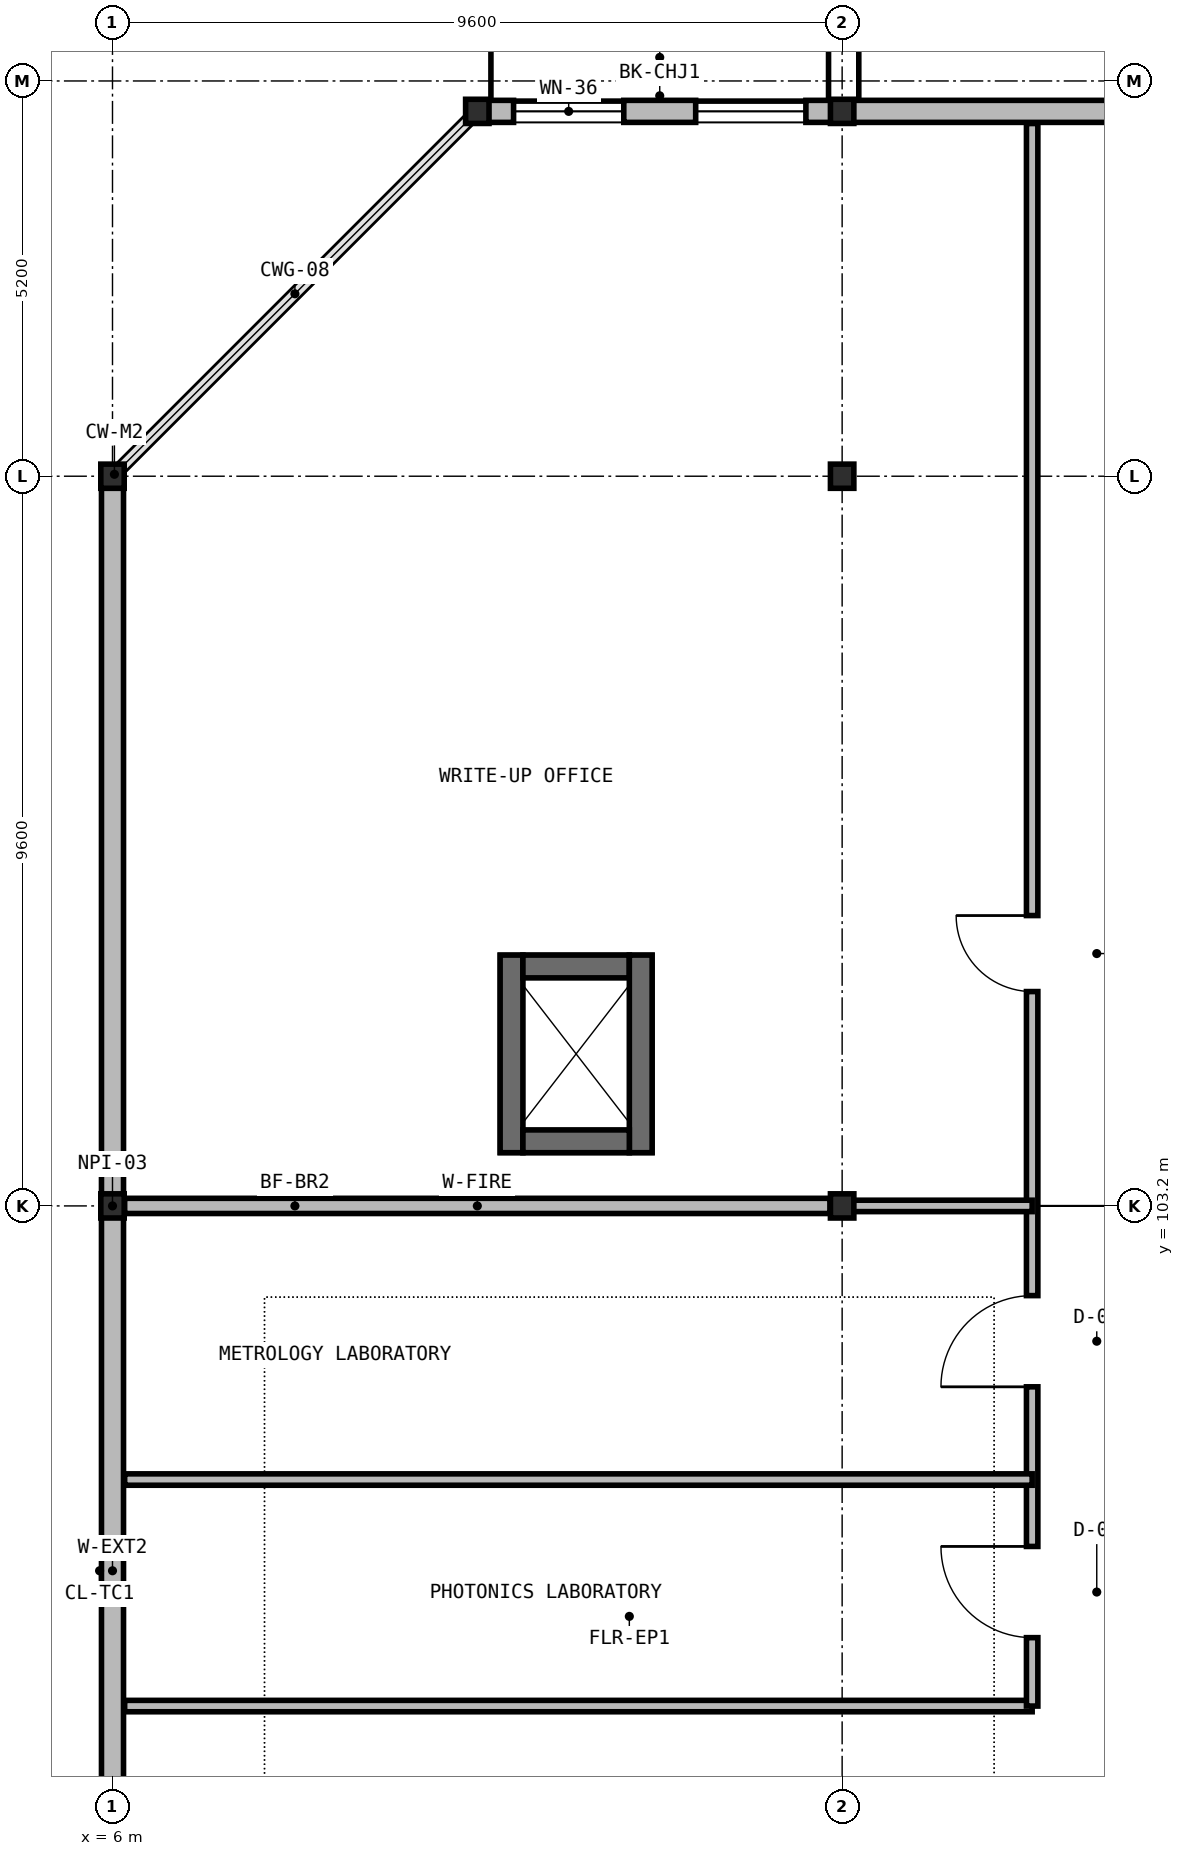
"""IFC4 building model, lengths in metres.
Left out: names, types, materials, properties, quantities, classifications, styles, units other than length and angle.
Written with IfcOpenShell. Run it as: python <this file> out.ifc"""

import sys

from ifc_helpers import new_model, si_unit, direction, frame, frame_2d, origin, origin_2d, place, context, subcontext, project, spatial, rectangle, i_section, extrude, element, fill, save


model = new_model("IFC4")
c1 = context("Model", 3, precision=1e-05, world=origin(), true_north=direction((0.0, 1.0)))
c2 = subcontext(c1, "Body", "Model", "MODEL_VIEW")
j1 = project(units=[si_unit("LENGTHUNIT", "METRE"), si_unit("PLANEANGLEUNIT", "RADIAN")], contexts=[c1])
p1 = place(None, origin())
s1 = spatial("IfcSite", under=j1, at=p1, CompositionType="ELEMENT")
p2 = place(p1, origin())
s2 = spatial("IfcBuilding", under=s1, at=p2, CompositionType="ELEMENT")
p3 = place(p2, frame((0.0, 0.0, 18.9)))
s3 = spatial("IfcBuildingStorey", under=s2, at=p3, CompositionType="ELEMENT", Elevation=18.9)
for number, where, z_axis, x_axis in (
    (1, (6.0, 103.2, 0.0), (0.0, 0.0, 1.0), (1.0, 0.0, 0.0)),
    (2, (6.0, 112.8, 0.0), (0.0, 0.0, 1.0), (1.0, 0.0, 0.0)),
    (3, (15.6, 103.2, 0.0), (0.0, 0.0, 1.0), (1.0, 0.0, 0.0)),
    (4, (15.6, 112.8, 0.0), (0.0, 0.0, 1.0), (1.0, 0.0, 0.0)),
    (5, (15.6, 117.6, 0.0), (0.0, 0.0, 1.0), (1.0, 0.0, 0.0)),
    (6, (10.8, 117.6, 0.0), (0.0, 0.0, 1.0), (1.0, 0.0, 0.0)),
):
    element("IfcColumn", number, at=place(p3, frame(where, z_axis=z_axis, x_axis=x_axis)), inside=s3, PredefinedType="COLUMN", context=c2, shape_type="SweptSolid", body=[
        extrude(i_section(OverallWidth=0.308, OverallDepth=0.318, WebThickness=0.013, FlangeThickness=0.021, at=origin_2d()), origin(), (0.0, 0.0, 1.0), 4.55),
    ])
p4 = place(p3, frame((11.25, 103.9, 0.0), z_axis=(0.0, 0.0, 1.0), x_axis=(0.0, 1.0, 0.0)))
e7 = element("IfcWall", 7, at=p4, inside=s3, PredefinedType="SHEAR", context=c2, shape_type="SweptSolid", body=[
    extrude(rectangle(XDim=2.6, YDim=0.3, at=frame_2d((1.3, 0.0))), origin(), (0.0, 0.0, 1.0), 4.37),
])
p5 = place(p3, frame((11.4, 106.35, 0.0), z_axis=(0.0, 0.0, 1.0), x_axis=(1.0, 0.0, 0.0)))
e8 = element("IfcWall", 8, at=p5, inside=s3, PredefinedType="SHEAR", context=c2, shape_type="SweptSolid", body=[
    extrude(rectangle(XDim=1.4, YDim=0.3, at=frame_2d((0.7, 0.0))), origin(), (0.0, 0.0, 1.0), 4.37),
])
p6 = place(p3, frame((12.95, 106.5, 0.0), z_axis=(0.0, 0.0, 1.0), x_axis=(0.0, -1.0, 0.0)))
e9 = element("IfcWall", 9, at=p6, inside=s3, PredefinedType="SHEAR", context=c2, shape_type="SweptSolid", body=[
    extrude(rectangle(XDim=2.6, YDim=0.3, at=frame_2d((1.3, 0.0))), origin(), (0.0, 0.0, 1.0), 4.37),
])
p7 = place(p3, frame((12.8, 104.05, 0.0), z_axis=(0.0, 0.0, 1.0), x_axis=(-1.0, 0.0, 0.0)))
e10 = element("IfcWall", 10, at=p7, inside=s3, PredefinedType="SHEAR", context=c2, shape_type="SweptSolid", body=[
    extrude(rectangle(XDim=1.4, YDim=0.3, at=frame_2d((0.7, 0.0))), origin(), (0.0, 0.0, 1.0), 4.37),
])
p8 = place(p3, frame((6.0, 93.604, 0.0), z_axis=(0.0, 0.0, 1.0), x_axis=(0.0, 1.0, 0.0)))
e11 = element("IfcWall", 11, at=p8, inside=s3, PredefinedType="SOLIDWALL", context=c2, shape_type="SweptSolid", body=[
    extrude(rectangle(XDim=9.592, YDim=0.29, at=frame_2d((4.796, 0.0))), origin(), (0.0, 0.0, 1.0), 3.884),
])
p9 = place(p3, frame((6.0, 103.204, 0.0), z_axis=(0.0, 0.0, 1.0), x_axis=(0.0, 1.0, 0.0)))
e12 = element("IfcWall", 12, at=p9, inside=s3, PredefinedType="SOLIDWALL", context=c2, shape_type="SweptSolid", body=[
    extrude(rectangle(XDim=9.592, YDim=0.29, at=frame_2d((4.796, 0.0))), origin(), (0.0, 0.0, 1.0), 3.884),
])
p10 = place(p3, frame((10.804, 117.6, 0.0), z_axis=(0.0, 0.0, 1.0), x_axis=(1.0, 0.0, 0.0)))
e13 = element("IfcWall", 13, at=p10, inside=s3, PredefinedType="SOLIDWALL", context=c2, shape_type="SweptSolid", body=[
    extrude(rectangle(XDim=4.792, YDim=0.29, at=frame_2d((2.396, 0.0))), origin(), (0.0, 0.0, 1.0), 4.37),
])
p11 = place(p10, frame((0.473, 0.0, 0.95)))
e14 = element("IfcOpeningElement", 14, at=p11, cuts=e13, PredefinedType="OPENING", context=c2, shape_type="SweptSolid", body=[
    extrude(rectangle(XDim=1.45, YDim=1.43, at=frame_2d((0.725, 0.715))), frame((0.0, 0.155, 0.0), z_axis=(0.0, -1.0, 0.0), x_axis=(1.0, 0.0, 0.0)), (0.0, 0.0, 1.0), 0.31),
])
p12 = place(p10, frame((2.869, 0.0, 0.95)))
e15 = element("IfcOpeningElement", 15, at=p12, cuts=e13, PredefinedType="OPENING", context=c2, shape_type="SweptSolid", body=[
    extrude(rectangle(XDim=1.45, YDim=1.43, at=frame_2d((0.725, 0.715))), frame((0.0, 0.155, 0.0), z_axis=(0.0, -1.0, 0.0), x_axis=(1.0, 0.0, 0.0)), (0.0, 0.0, 1.0), 0.31),
])
p13 = place(p3, frame((15.604, 117.6, 0.0), z_axis=(0.0, 0.0, 1.0), x_axis=(1.0, 0.0, 0.0)))
e16 = element("IfcWall", 16, at=p13, inside=s3, PredefinedType="SOLIDWALL", context=c2, shape_type="SweptSolid", body=[
    extrude(rectangle(XDim=9.592, YDim=0.29, at=frame_2d((4.796, 0.0))), origin(), (0.0, 0.0, 1.0), 3.837),
])
p14 = place(p3, frame((6.16, 103.2, 0.0), z_axis=(0.0, 0.0, 1.0), x_axis=(1.0, 0.0, 0.0)))
e17 = element("IfcWall", 17, at=p14, inside=s3, PredefinedType="SOLIDWALL", context=c2, shape_type="SweptSolid", body=[
    extrude(rectangle(XDim=9.28, YDim=0.2, at=frame_2d((4.64, 0.0))), origin(), (0.0, 0.0, 1.0), 3.815),
])
p15 = place(p3, frame((6.16, 96.62, 0.0), z_axis=(0.0, 0.0, 1.0), x_axis=(1.0, 0.0, 0.0)))
e18 = element("IfcWall", 18, at=p15, inside=s3, PredefinedType="PARTITIONING", context=c2, shape_type="SweptSolid", body=[
    extrude(rectangle(XDim=11.94, YDim=0.15, at=frame_2d((5.97, 0.0))), origin(), (0.0, 0.0, 1.0), 4.3),
])
p16 = place(p3, frame((18.1, 96.62, 0.0), z_axis=(0.0, 0.0, 1.0), x_axis=(0.0, 1.0, 0.0)))
e19 = element("IfcWall", 19, at=p16, inside=s3, PredefinedType="PARTITIONING", context=c2, shape_type="SweptSolid", body=[
    extrude(rectangle(XDim=20.82, YDim=0.15, at=frame_2d((10.41, 0.0))), origin(), (0.0, 0.0, 1.0), 4.3),
])
p17 = place(p16, frame((0.9, 0.0, 0.0)))
e20 = element("IfcOpeningElement", 20, at=p17, cuts=e19, PredefinedType="OPENING", context=c2, shape_type="SweptSolid", body=[
    extrude(rectangle(XDim=1.2, YDim=2.2, at=frame_2d((0.6, 1.1))), frame((0.0, 0.085, 0.0), z_axis=(0.0, -1.0, 0.0), x_axis=(1.0, 0.0, 0.0)), (0.0, 0.0, 1.0), 0.17),
])
p18 = place(p16, frame((4.2, 0.0, 0.0)))
e21 = element("IfcOpeningElement", 21, at=p18, cuts=e19, PredefinedType="OPENING", context=c2, shape_type="SweptSolid", body=[
    extrude(rectangle(XDim=1.2, YDim=2.2, at=frame_2d((0.6, 1.1))), frame((0.0, 0.085, 0.0), z_axis=(0.0, -1.0, 0.0), x_axis=(1.0, 0.0, 0.0)), (0.0, 0.0, 1.0), 0.17),
])
p19 = place(p16, frame((9.4, 0.0, 0.0)))
e22 = element("IfcOpeningElement", 22, at=p19, cuts=e19, PredefinedType="OPENING", context=c2, shape_type="SweptSolid", body=[
    extrude(rectangle(XDim=1.0, YDim=2.2, at=frame_2d((0.5, 1.1))), frame((0.0, 0.085, 0.0), z_axis=(0.0, -1.0, 0.0), x_axis=(1.0, 0.0, 0.0)), (0.0, 0.0, 1.0), 0.17),
])
p20 = place(p3, frame((6.16, 99.6, 0.0), z_axis=(0.0, 0.0, 1.0), x_axis=(1.0, 0.0, 0.0)))
e23 = element("IfcWall", 23, at=p20, inside=s3, PredefinedType="PARTITIONING", context=c2, shape_type="SweptSolid", body=[
    extrude(rectangle(XDim=11.94, YDim=0.15, at=frame_2d((5.97, 0.0))), origin(), (0.0, 0.0, 1.0), 4.3),
])
p21 = place(p3, frame((15.55, 103.2, 0.0), z_axis=(0.0, 0.0, 1.0), x_axis=(1.0, 0.0, 0.0)))
e24 = element("IfcWall", 24, at=p21, inside=s3, PredefinedType="PARTITIONING", context=c2, shape_type="SweptSolid", body=[
    extrude(rectangle(XDim=2.55, YDim=0.15, at=frame_2d((1.275, 0.0))), origin(), (0.0, 0.0, 1.0), 3.815),
])
p22 = place(p11, origin())
e25 = element("IfcWindow", 25, at=p22, inside=s3, PartitioningType="SINGLE_PANEL", PredefinedType="WINDOW", context=c2, shape_type="SweptSolid", body=[
    extrude(rectangle(XDim=1.45, YDim=1.43, at=frame_2d((0.725, 0.715))), frame((0.0, 0.03, 0.0), z_axis=(0.0, -1.0, 0.0), x_axis=(1.0, 0.0, 0.0)), (0.0, 0.0, 1.0), 0.06),
])
fill(e14, e25)
p23 = place(p12, origin())
e26 = element("IfcWindow", 26, at=p23, inside=s3, PartitioningType="SINGLE_PANEL", PredefinedType="WINDOW", context=c2, shape_type="SweptSolid", body=[
    extrude(rectangle(XDim=1.45, YDim=1.43, at=frame_2d((0.725, 0.715))), frame((0.0, 0.03, 0.0), z_axis=(0.0, -1.0, 0.0), x_axis=(1.0, 0.0, 0.0)), (0.0, 0.0, 1.0), 0.06),
])
fill(e15, e26)
p24 = place(p17, origin())
e27 = element("IfcDoor", 27, at=p24, inside=s3, OperationType="SINGLE_SWING_RIGHT", PredefinedType="DOOR", context=c2, shape_type="SweptSolid", body=[
    extrude(rectangle(XDim=1.2, YDim=2.2, at=frame_2d((0.6, 1.1))), frame((0.0, 0.025, 0.0), z_axis=(0.0, -1.0, 0.0), x_axis=(1.0, 0.0, 0.0)), (0.0, 0.0, 1.0), 0.05),
])
fill(e20, e27)
p25 = place(p18, origin())
e28 = element("IfcDoor", 28, at=p25, inside=s3, OperationType="SINGLE_SWING_LEFT", PredefinedType="DOOR", context=c2, shape_type="SweptSolid", body=[
    extrude(rectangle(XDim=1.2, YDim=2.2, at=frame_2d((0.6, 1.1))), frame((0.0, 0.025, 0.0), z_axis=(0.0, -1.0, 0.0), x_axis=(1.0, 0.0, 0.0)), (0.0, 0.0, 1.0), 0.05),
])
fill(e21, e28)
p26 = place(p19, origin())
e29 = element("IfcDoor", 29, at=p26, inside=s3, OperationType="SINGLE_SWING_RIGHT", PredefinedType="DOOR", context=c2, shape_type="SweptSolid", body=[
    extrude(rectangle(XDim=1.0, YDim=2.2, at=frame_2d((0.5, 1.1))), frame((0.0, 0.025, 0.0), z_axis=(0.0, -1.0, 0.0), x_axis=(1.0, 0.0, 0.0)), (0.0, 0.0, 1.0), 0.05),
])
fill(e22, e29)
save(model, sys.argv[1])
